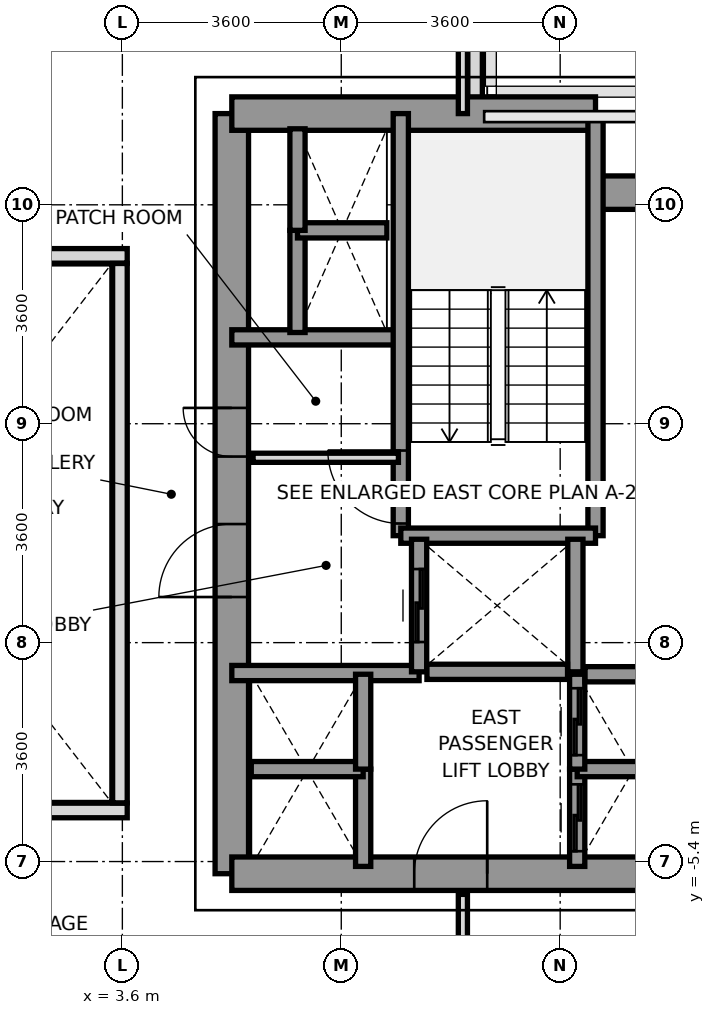
"""IFC4 building model, lengths in metres.
Left out: names, types, materials, properties, quantities, classifications, styles, units other than length and angle.
Written with IfcOpenShell. Run it as: python <this file> out.ifc"""

import sys

from ifc_helpers import new_model, si_unit, direction, frame, frame_2d, origin, place, context, subcontext, project, spatial, rectangle, extrude, source, transform, mapped, element, fill, save


model = new_model("IFC4")
c1 = context("Model", 3, precision=1e-05, world=origin(), true_north=direction((0.0, 1.0)))
c2 = subcontext(c1, "Body", "Model", "MODEL_VIEW")
j1 = project(units=[si_unit("LENGTHUNIT", "METRE"), si_unit("PLANEANGLEUNIT", "RADIAN")], contexts=[c1])
p1 = place(None, origin())
s1 = spatial("IfcSite", under=j1, at=p1, CompositionType="ELEMENT")
p2 = place(p1, origin())
s2 = spatial("IfcBuilding", under=s1, at=p2, CompositionType="ELEMENT")
p3 = place(p2, frame((0.0, 0.0, 37.4)))
s3 = spatial("IfcBuildingStorey", under=s2, at=p3, CompositionType="ELEMENT", Elevation=37.4)
p4 = place(p3, frame((9.4, 8.397, 0.0), z_axis=(0.0, 0.0, 1.0), x_axis=(0.0, -1.0, 0.0)))
e1 = element("IfcWall", 1, at=p4, inside=s3, PredefinedType="PARAPET", context=c2, shape_type="SweptSolid", body=[
    extrude(rectangle(XDim=1.444, YDim=0.24, at=frame_2d((0.722, 0.0))), origin(), (0.0, 0.0, 1.0), 1.15),
])
p5 = place(p3, frame((5.4, -5.6, 0.0), z_axis=(0.0, 0.0, 1.0), x_axis=(0.0, 1.0, 0.0)))
e2 = element("IfcWall", 2, at=p5, inside=s3, PredefinedType="SHEAR", context=c2, shape_type="SweptSolid", body=[
    extrude(rectangle(XDim=12.5, YDim=0.55, at=frame_2d((6.25, 0.0))), origin(), (0.0, 0.0, 1.0), 3.2),
])
p6 = place(p5, frame((4.55, 0.0, 0.0)))
e3 = element("IfcOpeningElement", 3, at=p6, cuts=e2, PredefinedType="OPENING", context=c2, shape_type="SweptSolid", body=[
    extrude(rectangle(XDim=1.2, YDim=2.2, at=frame_2d((0.6, 1.1))), frame((0.0, 0.285, 0.0), z_axis=(0.0, -1.0, 0.0), x_axis=(1.0, 0.0, 0.0)), (0.0, 0.0, 1.0), 0.57),
])
p7 = place(p5, frame((6.86, 0.0, 0.0)))
e4 = element("IfcOpeningElement", 4, at=p7, cuts=e2, PredefinedType="OPENING", context=c2, shape_type="SweptSolid", body=[
    extrude(rectangle(XDim=0.8, YDim=2.1, at=frame_2d((0.4, 1.05))), frame((0.0, 0.285, 0.0), z_axis=(0.0, -1.0, 0.0), x_axis=(1.0, 0.0, 0.0)), (0.0, 0.0, 1.0), 0.57),
])
p8 = place(p3, frame((5.4, 6.9, 0.0), z_axis=(0.0, 0.0, 1.0), x_axis=(1.0, 0.0, 0.0)))
e5 = element("IfcWall", 5, at=p8, inside=s3, PredefinedType="SHEAR", context=c2, shape_type="SweptSolid", body=[
    extrude(rectangle(XDim=5.981, YDim=0.55, at=frame_2d((2.991, 0.0))), origin(), (0.0, 0.0, 1.0), 3.2),
])
p9 = place(p3, frame((11.381, 5.6, 0.0), z_axis=(0.0, 0.0, 1.0), x_axis=(1.0, 0.0, 0.0)))
e6 = element("IfcWall", 6, at=p9, inside=s3, PredefinedType="SHEAR", context=c2, shape_type="SweptSolid", body=[
    extrude(rectangle(XDim=1.819, YDim=0.55, at=frame_2d((0.909, 0.0))), origin(), (0.0, 0.0, 1.0), 3.2),
])
p10 = place(p3, frame((5.4, -5.6, 0.0), z_axis=(0.0, 0.0, 1.0), x_axis=(1.0, 0.0, 0.0)))
e7 = element("IfcWall", 7, at=p10, inside=s3, PredefinedType="SHEAR", context=c2, shape_type="SweptSolid", body=[
    extrude(rectangle(XDim=7.8, YDim=0.55, at=frame_2d((3.9, 0.0))), origin(), (0.0, 0.0, 1.0), 3.2),
])
p11 = place(p10, frame((3.0, 0.0, 0.0)))
e8 = element("IfcOpeningElement", 8, at=p11, cuts=e7, PredefinedType="OPENING", context=c2, shape_type="SweptSolid", body=[
    extrude(rectangle(XDim=1.2, YDim=2.2, at=frame_2d((0.6, 1.1))), frame((0.0, 0.285, 0.0), z_axis=(0.0, -1.0, 0.0), x_axis=(1.0, 0.0, 0.0)), (0.0, 0.0, 1.0), 0.57),
])
p12 = place(p3, frame((5.4, 3.22, 0.0), z_axis=(0.0, 0.0, 1.0), x_axis=(1.0, 0.0, 0.0)))
e9 = element("IfcWall", 9, at=p12, inside=s3, PredefinedType="SOLIDWALL", context=c2, shape_type="SweptSolid", body=[
    extrude(rectangle(XDim=2.78, YDim=0.25, at=frame_2d((1.39, 0.0))), origin(), (0.0, 0.0, 1.0), 3.2),
])
p13 = place(p3, frame((5.4, -2.3, 0.0), z_axis=(0.0, 0.0, 1.0), x_axis=(1.0, 0.0, 0.0)))
e10 = element("IfcWall", 10, at=p13, inside=s3, PredefinedType="SOLIDWALL", context=c2, shape_type="SweptSolid", body=[
    extrude(rectangle(XDim=3.08, YDim=0.25, at=frame_2d((1.54, 0.0))), origin(), (0.0, 0.0, 1.0), 3.2),
])
p14 = place(p3, frame((8.179, -0.041, 0.0), z_axis=(0.0, 0.0, 1.0), x_axis=(0.0, 1.0, 0.0)))
e11 = element("IfcWall", 11, at=p14, inside=s3, PredefinedType="SOLIDWALL", context=c2, shape_type="SweptSolid", body=[
    extrude(rectangle(XDim=6.941, YDim=0.25, at=frame_2d((3.47, 0.0))), origin(), (0.0, 0.0, 1.0), 3.2),
])
p15 = place(p14, frame((0.2, 0.0, 0.0)))
e12 = element("IfcOpeningElement", 12, at=p15, cuts=e11, PredefinedType="OPENING", context=c2, shape_type="SweptSolid", body=[
    extrude(rectangle(XDim=1.2, YDim=2.2, at=frame_2d((0.6, 1.1))), frame((0.0, 0.135, 0.0), z_axis=(0.0, -1.0, 0.0), x_axis=(1.0, 0.0, 0.0)), (0.0, 0.0, 1.0), 0.27),
])
p16 = place(p3, frame((11.381, -0.041, 0.0), z_axis=(0.0, 0.0, 1.0), x_axis=(0.0, 1.0, 0.0)))
e13 = element("IfcWall", 13, at=p16, inside=s3, PredefinedType="SOLIDWALL", context=c2, shape_type="SweptSolid", body=[
    extrude(rectangle(XDim=6.941, YDim=0.25, at=frame_2d((3.47, 0.0))), origin(), (0.0, 0.0, 1.0), 3.2),
])
p17 = place(p3, frame((8.179, -0.041, 0.0), z_axis=(0.0, 0.0, 1.0), x_axis=(1.0, 0.0, 0.0)))
e14 = element("IfcWall", 14, at=p17, inside=s3, PredefinedType="SOLIDWALL", context=c2, shape_type="SweptSolid", body=[
    extrude(rectangle(XDim=3.202, YDim=0.25, at=frame_2d((1.601, 0.0))), origin(), (0.0, 0.0, 1.0), 3.2),
])
p18 = place(p3, frame((8.48, -2.28, 0.0), z_axis=(0.0, 0.0, 1.0), x_axis=(0.0, 1.0, 0.0)))
e15 = element("IfcWall", 15, at=p18, inside=s3, PredefinedType="SOLIDWALL", context=c2, shape_type="SweptSolid", body=[
    extrude(rectangle(XDim=2.18, YDim=0.25, at=frame_2d((1.09, 0.0))), origin(), (0.0, 0.0, 1.0), 3.2),
])
p19 = place(p18, frame((0.49, 0.0, 0.0)))
e16 = element("IfcOpeningElement", 16, at=p19, cuts=e15, PredefinedType="OPENING", context=c2, shape_type="SweptSolid", body=[
    extrude(rectangle(XDim=1.2, YDim=2.2, at=frame_2d((0.6, 1.1))), frame((0.0, 0.135, 0.0), z_axis=(0.0, -1.0, 0.0), x_axis=(1.0, 0.0, 0.0)), (0.0, 0.0, 1.0), 0.27),
])
p20 = place(p3, frame((11.05, -2.28, 0.0), z_axis=(0.0, 0.0, 1.0), x_axis=(0.0, 1.0, 0.0)))
e17 = element("IfcWall", 17, at=p20, inside=s3, PredefinedType="SOLIDWALL", context=c2, shape_type="SweptSolid", body=[
    extrude(rectangle(XDim=2.18, YDim=0.25, at=frame_2d((1.09, 0.0))), origin(), (0.0, 0.0, 1.0), 3.2),
])
p21 = place(p3, frame((8.609, -2.28, 0.0), z_axis=(0.0, 0.0, 1.0), x_axis=(1.0, 0.0, 0.0)))
e18 = element("IfcWall", 18, at=p21, inside=s3, PredefinedType="SOLIDWALL", context=c2, shape_type="SweptSolid", body=[
    extrude(rectangle(XDim=2.312, YDim=0.25, at=frame_2d((1.156, 0.0))), origin(), (0.0, 0.0, 1.0), 3.2),
])
p22 = place(p3, frame((11.08, -5.48, 0.0), z_axis=(0.0, 0.0, 1.0), x_axis=(0.0, 1.0, 0.0)))
e19 = element("IfcWall", 19, at=p22, inside=s3, PredefinedType="SOLIDWALL", context=c2, shape_type="SweptSolid", body=[
    extrude(rectangle(XDim=1.6, YDim=0.25, at=frame_2d((0.8, 0.0))), origin(), (0.0, 0.0, 1.0), 3.2),
])
p23 = place(p22, frame((0.25, 0.0, 0.0)))
e20 = element("IfcOpeningElement", 20, at=p23, cuts=e19, PredefinedType="OPENING", context=c2, shape_type="SweptSolid", body=[
    extrude(rectangle(XDim=1.1, YDim=2.2, at=frame_2d((0.55, 1.1))), frame((0.0, 0.135, 0.0), z_axis=(0.0, -1.0, 0.0), x_axis=(1.0, 0.0, 0.0)), (0.0, 0.0, 1.0), 0.27),
])
p24 = place(p3, frame((11.08, -3.88, 0.0), z_axis=(0.0, 0.0, 1.0), x_axis=(1.0, 0.0, 0.0)))
e21 = element("IfcWall", 21, at=p24, inside=s3, PredefinedType="SOLIDWALL", context=c2, shape_type="SweptSolid", body=[
    extrude(rectangle(XDim=1.84, YDim=0.25, at=frame_2d((0.92, 0.0))), origin(), (0.0, 0.0, 1.0), 3.2),
])
p25 = place(p3, frame((11.08, -3.88, 0.0), z_axis=(0.0, 0.0, 1.0), x_axis=(0.0, 1.0, 0.0)))
e22 = element("IfcWall", 22, at=p25, inside=s3, PredefinedType="SOLIDWALL", context=c2, shape_type="SweptSolid", body=[
    extrude(rectangle(XDim=1.56, YDim=0.25, at=frame_2d((0.78, 0.0))), origin(), (0.0, 0.0, 1.0), 3.2),
])
p26 = place(p25, frame((0.23, 0.0, 0.0)))
e23 = element("IfcOpeningElement", 23, at=p26, cuts=e22, PredefinedType="OPENING", context=c2, shape_type="SweptSolid", body=[
    extrude(rectangle(XDim=1.1, YDim=2.2, at=frame_2d((0.55, 1.1))), frame((0.0, 0.135, 0.0), z_axis=(0.0, -1.0, 0.0), x_axis=(1.0, 0.0, 0.0)), (0.0, 0.0, 1.0), 0.27),
])
p27 = place(p3, frame((11.209, -2.32, 0.0), z_axis=(0.0, 0.0, 1.0), x_axis=(1.0, 0.0, 0.0)))
e24 = element("IfcWall", 24, at=p27, inside=s3, PredefinedType="SOLIDWALL", context=c2, shape_type="SweptSolid", body=[
    extrude(rectangle(XDim=1.582, YDim=0.25, at=frame_2d((0.791, 0.0))), origin(), (0.0, 0.0, 1.0), 3.2),
])
p28 = place(p3, frame((7.56, -5.48, 0.0), z_axis=(0.0, 0.0, 1.0), x_axis=(0.0, 1.0, 0.0)))
e25 = element("IfcWall", 25, at=p28, inside=s3, PredefinedType="SOLIDWALL", context=c2, shape_type="SweptSolid", body=[
    extrude(rectangle(XDim=1.6, YDim=0.25, at=frame_2d((0.8, 0.0))), origin(), (0.0, 0.0, 1.0), 3.2),
])
p29 = place(p3, frame((5.72, -3.88, 0.0), z_axis=(0.0, 0.0, 1.0), x_axis=(1.0, 0.0, 0.0)))
e26 = element("IfcWall", 26, at=p29, inside=s3, PredefinedType="SOLIDWALL", context=c2, shape_type="SweptSolid", body=[
    extrude(rectangle(XDim=1.84, YDim=0.25, at=frame_2d((0.92, 0.0))), origin(), (0.0, 0.0, 1.0), 3.2),
])
p30 = place(p3, frame((7.56, -3.88, 0.0), z_axis=(0.0, 0.0, 1.0), x_axis=(0.0, 1.0, 0.0)))
e27 = element("IfcWall", 27, at=p30, inside=s3, PredefinedType="SOLIDWALL", context=c2, shape_type="SweptSolid", body=[
    extrude(rectangle(XDim=1.56, YDim=0.25, at=frame_2d((0.78, 0.0))), origin(), (0.0, 0.0, 1.0), 3.2),
])
p31 = place(p3, frame((6.48, 3.3, 0.0), z_axis=(0.0, 0.0, 1.0), x_axis=(0.0, 1.0, 0.0)))
e28 = element("IfcWall", 28, at=p31, inside=s3, PredefinedType="SOLIDWALL", context=c2, shape_type="SweptSolid", body=[
    extrude(rectangle(XDim=1.68, YDim=0.25, at=frame_2d((0.84, 0.0))), origin(), (0.0, 0.0, 1.0), 3.2),
])
p32 = place(p3, frame((6.48, 4.98, 0.0), z_axis=(0.0, 0.0, 1.0), x_axis=(1.0, 0.0, 0.0)))
e29 = element("IfcWall", 29, at=p32, inside=s3, PredefinedType="SOLIDWALL", context=c2, shape_type="SweptSolid", body=[
    extrude(rectangle(XDim=1.47, YDim=0.25, at=frame_2d((0.735, 0.0))), origin(), (0.0, 0.0, 1.0), 3.2),
])
p33 = place(p3, frame((6.48, 4.98, 0.0), z_axis=(0.0, 0.0, 1.0), x_axis=(0.0, 1.0, 0.0)))
e30 = element("IfcWall", 30, at=p33, inside=s3, PredefinedType="SOLIDWALL", context=c2, shape_type="SweptSolid", body=[
    extrude(rectangle(XDim=1.67, YDim=0.25, at=frame_2d((0.835, 0.0))), origin(), (0.0, 0.0, 1.0), 3.2),
])
p34 = place(p3, frame((5.75, 1.24, 0.0), z_axis=(0.0, 0.0, 1.0), x_axis=(1.0, 0.0, 0.0)))
e31 = element("IfcWall", 31, at=p34, inside=s3, PredefinedType="PARTITIONING", context=c2, shape_type="SweptSolid", body=[
    extrude(rectangle(XDim=2.39, YDim=0.15, at=frame_2d((1.195, 0.0))), origin(), (0.0, 0.0, 1.0), 2.3),
])
p35 = place(p3, frame((9.2, 6.9, 0.0), z_axis=(0.0, 0.0, 1.0), x_axis=(0.0, 1.0, 0.0)))
e32 = element("IfcWall", 32, at=p35, inside=s3, PredefinedType="PARTITIONING", context=c2, shape_type="SweptSolid", body=[
    extrude(rectangle(XDim=8.78, YDim=0.15, at=frame_2d((4.39, 0.0))), origin(), (0.0, 0.0, 1.0), 2.65),
])
p36 = place(p3, frame((9.2, -15.68, 0.0), z_axis=(0.0, 0.0, 1.0), x_axis=(0.0, 1.0, 0.0)))
e33 = element("IfcWall", 33, at=p36, inside=s3, PredefinedType="PARTITIONING", context=c2, shape_type="SweptSolid", body=[
    extrude(rectangle(XDim=9.74, YDim=0.15, at=frame_2d((4.87, 0.0))), origin(), (0.0, 0.0, 1.0), 2.65),
])
for number, where, z_axis, x_axis in (
    (34, (-3.68, -4.56, 0.0), (0.0, 0.0, 1.0), (1.0, 0.0, 0.0)),
    (35, (-3.68, 4.56, 0.0), (0.0, 0.0, 1.0), (1.0, 0.0, 0.0)),
):
    element("IfcWall", number, at=place(p3, frame(where, z_axis=z_axis, x_axis=x_axis)), inside=s3, PredefinedType="PARAPET", context=c2, shape_type="SweptSolid", body=[
        extrude(rectangle(XDim=7.36, YDim=0.24, at=frame_2d((3.68, 0.0))), origin(), (0.0, 0.0, 1.0), 1.15),
    ])
p37 = place(p3, frame((3.56, -4.435, 0.0), z_axis=(0.0, 0.0, 1.0), x_axis=(0.0, 1.0, 0.0)))
e36 = element("IfcWall", 36, at=p37, inside=s3, PredefinedType="PARAPET", context=c2, shape_type="SweptSolid", body=[
    extrude(rectangle(XDim=8.87, YDim=0.24, at=frame_2d((4.435, 0.0))), origin(), (0.0, 0.0, 1.0), 1.15),
])
m1 = source(origin(), c2, "Body", "SweptSolid", [
    extrude(rectangle(XDim=1.2, YDim=2.2, at=frame_2d((0.6, 1.1))), frame((0.0, 0.025, 0.0), z_axis=(0.0, -1.0, 0.0), x_axis=(1.0, 0.0, 0.0)), (0.0, 0.0, 1.0), 0.05),
])
p38 = place(p15, origin())
e37 = element("IfcDoor", 37, at=p38, inside=s3, OperationType="SINGLE_SWING_RIGHT", PredefinedType="DOOR", context=c2, shape_type="MappedRepresentation", body=[
    mapped(m1, transform((0.0, 0.0, 0.0), x_axis=(1.0, 0.0, 0.0), y_axis=(0.0, 1.0, 0.0), z_axis=(0.0, 0.0, 1.0), scale=1.0)),
])
fill(e12, e37)
p39 = place(p6, origin())
e38 = element("IfcDoor", 38, at=p39, inside=s3, OperationType="SINGLE_SWING_LEFT", PredefinedType="DOOR", context=c2, shape_type="MappedRepresentation", body=[
    mapped(m1, transform((0.0, 0.0, 0.0), x_axis=(1.0, 0.0, 0.0), y_axis=(0.0, 1.0, 0.0), z_axis=(0.0, 0.0, 1.0), scale=1.0)),
])
fill(e3, e38)
p40 = place(p11, origin())
e39 = element("IfcDoor", 39, at=p40, inside=s3, OperationType="SINGLE_SWING_RIGHT", PredefinedType="DOOR", context=c2, shape_type="MappedRepresentation", body=[
    mapped(m1, transform((0.0, 0.0, 0.0), x_axis=(1.0, 0.0, 0.0), y_axis=(0.0, 1.0, 0.0), z_axis=(0.0, 0.0, 1.0), scale=1.0)),
])
fill(e8, e39)
m2 = source(origin(), c2, "Body", "SweptSolid", [
    extrude(rectangle(XDim=0.8, YDim=2.1, at=frame_2d((0.4, 1.05))), frame((0.0, 0.025, 0.0), z_axis=(0.0, -1.0, 0.0), x_axis=(1.0, 0.0, 0.0)), (0.0, 0.0, 1.0), 0.05),
])
p41 = place(p7, origin())
e40 = element("IfcDoor", 40, at=p41, inside=s3, OperationType="SINGLE_SWING_RIGHT", PredefinedType="DOOR", context=c2, shape_type="MappedRepresentation", body=[
    mapped(m2, transform((0.0, 0.0, 0.0), x_axis=(1.0, 0.0, 0.0), y_axis=(0.0, 1.0, 0.0), z_axis=(0.0, 0.0, 1.0), scale=1.0)),
])
fill(e4, e40)
p42 = place(p19, origin())
e41 = element("IfcDoor", 41, at=p42, inside=s3, OperationType="SLIDING_TO_RIGHT", PredefinedType="DOOR", context=c2, shape_type="MappedRepresentation", body=[
    mapped(m1, transform((0.0, 0.0, 0.0), x_axis=(1.0, 0.0, 0.0), y_axis=(0.0, 1.0, 0.0), z_axis=(0.0, 0.0, 1.0), scale=1.0)),
])
fill(e16, e41)
m3 = source(origin(), c2, "Body", "SweptSolid", [
    extrude(rectangle(XDim=1.1, YDim=2.2, at=frame_2d((0.55, 1.1))), frame((0.0, 0.025, 0.0), z_axis=(0.0, -1.0, 0.0), x_axis=(1.0, 0.0, 0.0)), (0.0, 0.0, 1.0), 0.05),
])
p43 = place(p23, origin())
e42 = element("IfcDoor", 42, at=p43, inside=s3, OperationType="SLIDING_TO_LEFT", PredefinedType="DOOR", context=c2, shape_type="MappedRepresentation", body=[
    mapped(m3, transform((0.0, 0.0, 0.0), x_axis=(1.0, 0.0, 0.0), y_axis=(0.0, 1.0, 0.0), z_axis=(0.0, 0.0, 1.0), scale=1.0)),
])
fill(e20, e42)
p44 = place(p26, origin())
e43 = element("IfcDoor", 43, at=p44, inside=s3, OperationType="SLIDING_TO_LEFT", PredefinedType="DOOR", context=c2, shape_type="MappedRepresentation", body=[
    mapped(m3, transform((0.0, 0.0, 0.0), x_axis=(1.0, 0.0, 0.0), y_axis=(0.0, 1.0, 0.0), z_axis=(0.0, 0.0, 1.0), scale=1.0)),
])
fill(e23, e43)
save(model, sys.argv[1])
